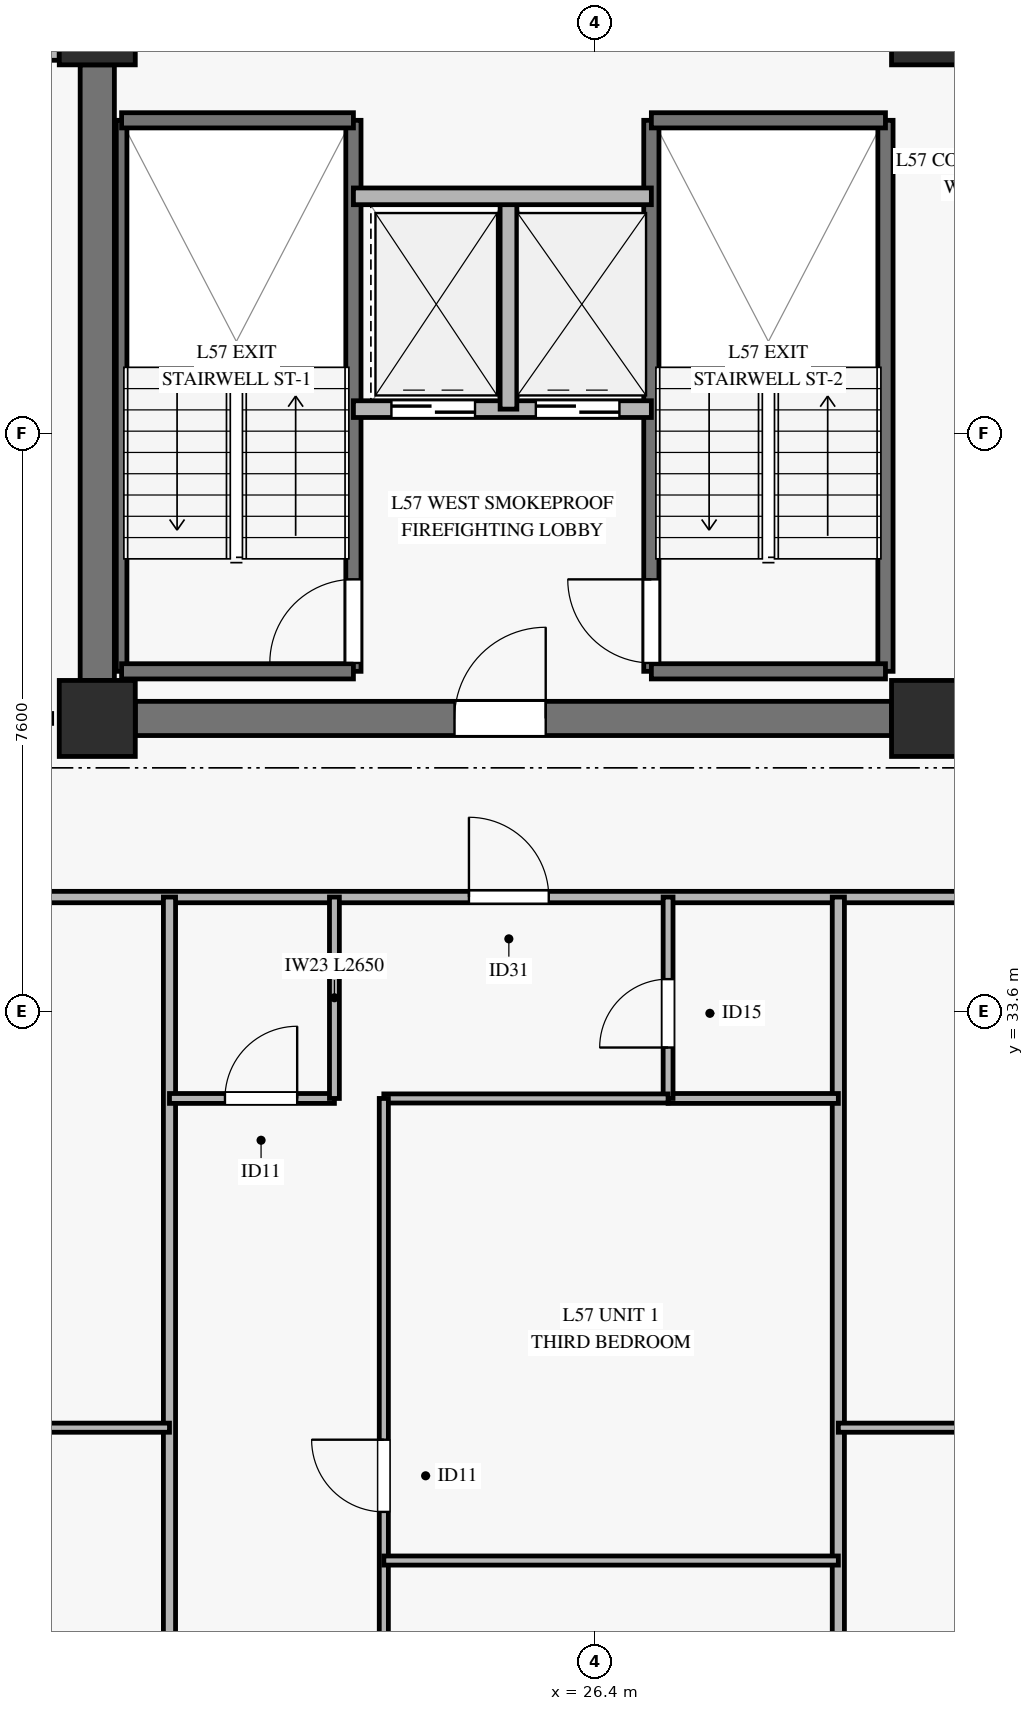
"""IFC4 building model, lengths in metres.
Left out: names, types, materials, properties, quantities, classifications, styles, units other than length and angle.
Written with IfcOpenShell. Run it as: python <this file> out.ifc"""

import sys

from ifc_helpers import new_model, si_unit, direction, frame, frame_2d, origin, origin_2d, place, context, subcontext, project, spatial, rectangle, extrude, source, transform, mapped, element, fill, save


model = new_model("IFC4")
c1 = context("Model", 3, precision=1e-05, world=origin(), true_north=direction((0.0, 1.0)))
c2 = subcontext(c1, "Body", "Model", "MODEL_VIEW")
j1 = project(units=[si_unit("LENGTHUNIT", "METRE"), si_unit("PLANEANGLEUNIT", "RADIAN")], contexts=[c1])
p1 = place(None, origin())
s1 = spatial("IfcSite", under=j1, at=p1, CompositionType="ELEMENT")
p2 = place(p1, origin())
s2 = spatial("IfcBuilding", under=s1, at=p2, CompositionType="ELEMENT")
p3 = place(p2, frame((0.0, 0.0, 227.0)))
s3 = spatial("IfcBuildingStorey", under=s2, at=p3, CompositionType="ELEMENT", Elevation=227.0)
m1 = source(origin(), c2, "Body", "SweptSolid", [
    extrude(rectangle(XDim=1.0, YDim=1.0, at=origin_2d()), origin(), (0.0, 0.0, 1.0), 3.185),
])
for number, where, z_axis, x_axis in (
    (1, (19.85, 37.45, 0.0), (0.0, 0.0, 1.0), (1.0, 0.0, 0.0)),
    (2, (19.85, 46.55, 0.0), (0.0, 0.0, 1.0), (1.0, 0.0, 0.0)),
    (3, (30.8, 37.45, 0.0), (0.0, 0.0, 1.0), (1.0, 0.0, 0.0)),
    (4, (30.8, 46.55, 0.0), (0.0, 0.0, 1.0), (1.0, 0.0, 0.0)),
):
    element("IfcColumn", number, at=place(p3, frame(where, z_axis=z_axis, x_axis=x_axis)), inside=s3, PredefinedType="PILASTER", context=c2, shape_type="MappedRepresentation", body=[
        mapped(m1, transform((0.0, 0.0, 0.0), x_axis=(1.0, 0.0, 0.0), y_axis=(0.0, 1.0, 0.0), z_axis=(0.0, 0.0, 1.0), scale=1.0)),
    ])
p4 = place(p3, frame((20.35, 37.45, 0.0), z_axis=(0.0, 0.0, 1.0), x_axis=(1.0, 0.0, 0.0)))
e5 = element("IfcWall", 5, at=p4, inside=s3, PredefinedType="SHEAR", context=c2, shape_type="SweptSolid", body=[
    extrude(rectangle(XDim=9.95, YDim=0.45, at=frame_2d((4.975, 0.0))), origin(), (0.0, 0.0, 1.0), 3.185),
])
p5 = place(p4, frame((4.2, 0.0, 0.0)))
e6 = element("IfcOpeningElement", 6, at=p5, cuts=e5, PredefinedType="OPENING", context=c2, shape_type="SweptSolid", body=[
    extrude(rectangle(XDim=1.2, YDim=2.15, at=frame_2d((0.6, 1.075))), frame((0.0, 0.235, 0.0), z_axis=(0.0, -1.0, 0.0), x_axis=(1.0, 0.0, 0.0)), (0.0, 0.0, 1.0), 0.47),
])
p6 = place(p3, frame((19.85, 37.95, 0.0), z_axis=(0.0, 0.0, 1.0), x_axis=(0.0, 1.0, 0.0)))
e7 = element("IfcWall", 7, at=p6, inside=s3, PredefinedType="SHEAR", context=c2, shape_type="SweptSolid", body=[
    extrude(rectangle(XDim=8.1, YDim=0.45, at=frame_2d((4.05, 0.0))), origin(), (0.0, 0.0, 1.0), 3.185),
])
p7 = place(p3, frame((10.54, 46.25, 0.0), z_axis=(0.0, 0.0, 1.0), x_axis=(1.0, 0.0, 0.0)))
e8 = element("IfcWall", 8, at=p7, inside=s3, PredefinedType="SOLIDWALL", context=c2, shape_type="SweptSolid", body=[
    extrude(rectangle(XDim=8.81, YDim=0.28, at=frame_2d((4.405, 0.0))), origin(), (0.0, 0.0, 1.0), 2.815),
])
p8 = place(p7, frame((3.605, 0.0, 0.45)))
e9 = element("IfcOpeningElement", 9, at=p8, cuts=e8, PredefinedType="OPENING", context=c2, shape_type="SweptSolid", body=[
    extrude(rectangle(XDim=1.6, YDim=2.0, at=frame_2d((0.8, 1.0))), frame((0.0, 0.15, 0.0), z_axis=(0.0, -1.0, 0.0), x_axis=(1.0, 0.0, 0.0)), (0.0, 0.0, 1.0), 0.3),
])
p9 = place(p3, frame((20.17, 38.07, 0.0), z_axis=(0.0, 0.0, 1.0), x_axis=(0.0, 1.0, 0.0)))
e10 = element("IfcWall", 10, at=p9, inside=s3, PredefinedType="SOLIDWALL", context=c2, shape_type="SweptSolid", body=[
    extrude(rectangle(XDim=7.25, YDim=0.14, at=frame_2d((3.625, 0.0))), origin(), (0.0, 0.0, 1.0), 3.4),
])
p10 = place(p3, frame((23.22, 38.07, 0.0), z_axis=(0.0, 0.0, 1.0), x_axis=(0.0, 1.0, 0.0)))
e11 = element("IfcWall", 11, at=p10, inside=s3, PredefinedType="SOLIDWALL", context=c2, shape_type="SweptSolid", body=[
    extrude(rectangle(XDim=7.25, YDim=0.2, at=frame_2d((3.625, 0.0))), origin(), (0.0, 0.0, 1.0), 3.4),
])
p11 = place(p10, frame((0.11, 0.0, 0.0)))
e12 = element("IfcOpeningElement", 12, at=p11, cuts=e11, PredefinedType="OPENING", context=c2, shape_type="SweptSolid", body=[
    extrude(rectangle(XDim=1.1, YDim=2.15, at=frame_2d((0.55, 1.075))), frame((0.0, 0.11, 0.0), z_axis=(0.0, -1.0, 0.0), x_axis=(1.0, 0.0, 0.0)), (0.0, 0.0, 1.0), 0.22),
])
for number, where, z_axis, x_axis in (
    (13, (20.17, 45.32, 0.0), (0.0, 0.0, 1.0), (1.0, 0.0, 0.0)),
    (14, (20.17, 38.07, 0.0), (0.0, 0.0, 1.0), (1.0, 0.0, 0.0)),
):
    element("IfcWall", number, at=place(p3, frame(where, z_axis=z_axis, x_axis=x_axis)), inside=s3, PredefinedType="SOLIDWALL", context=c2, shape_type="SweptSolid", body=[
        extrude(rectangle(XDim=3.05, YDim=0.2, at=frame_2d((1.525, 0.0))), origin(), (0.0, 0.0, 1.0), 3.4),
    ])
p12 = place(p3, frame((27.14, 38.07, 0.0), z_axis=(0.0, 0.0, 1.0), x_axis=(0.0, 1.0, 0.0)))
e15 = element("IfcWall", 15, at=p12, inside=s3, PredefinedType="SOLIDWALL", context=c2, shape_type="SweptSolid", body=[
    extrude(rectangle(XDim=7.25, YDim=0.2, at=frame_2d((3.625, 0.0))), origin(), (0.0, 0.0, 1.0), 3.4),
])
p13 = place(p12, frame((0.11, 0.0, 0.0)))
e16 = element("IfcOpeningElement", 16, at=p13, cuts=e15, PredefinedType="OPENING", context=c2, shape_type="SweptSolid", body=[
    extrude(rectangle(XDim=1.1, YDim=2.15, at=frame_2d((0.55, 1.075))), frame((0.0, 0.11, 0.0), z_axis=(0.0, -1.0, 0.0), x_axis=(1.0, 0.0, 0.0)), (0.0, 0.0, 1.0), 0.22),
])
p14 = place(p3, frame((30.22, 38.07, 0.0), z_axis=(0.0, 0.0, 1.0), x_axis=(0.0, 1.0, 0.0)))
e17 = element("IfcWall", 17, at=p14, inside=s3, PredefinedType="SOLIDWALL", context=c2, shape_type="SweptSolid", body=[
    extrude(rectangle(XDim=7.25, YDim=0.2, at=frame_2d((3.625, 0.0))), origin(), (0.0, 0.0, 1.0), 3.4),
])
for number, where, z_axis, x_axis in (
    (18, (27.14, 45.32, 0.0), (0.0, 0.0, 1.0), (1.0, 0.0, 0.0)),
    (19, (27.14, 38.07, 0.0), (0.0, 0.0, 1.0), (1.0, 0.0, 0.0)),
):
    element("IfcWall", number, at=place(p3, frame(where, z_axis=z_axis, x_axis=x_axis)), inside=s3, PredefinedType="SOLIDWALL", context=c2, shape_type="SweptSolid", body=[
        extrude(rectangle(XDim=3.08, YDim=0.2, at=frame_2d((1.54, 0.0))), origin(), (0.0, 0.0, 1.0), 3.4),
    ])
p15 = place(p3, frame((23.22, 41.52, 0.0), z_axis=(0.0, 0.0, 1.0), x_axis=(1.0, 0.0, 0.0)))
e20 = element("IfcWall", 20, at=p15, inside=s3, PredefinedType="SOLIDWALL", context=c2, shape_type="SweptSolid", body=[
    extrude(rectangle(XDim=3.92, YDim=0.22, at=frame_2d((1.96, 0.0))), origin(), (0.0, 0.0, 1.0), 3.185),
])
p16 = place(p15, frame((0.5, 0.0, 0.0)))
e21 = element("IfcOpeningElement", 21, at=p16, cuts=e20, PredefinedType="OPENING", context=c2, shape_type="SweptSolid", body=[
    extrude(rectangle(XDim=1.1, YDim=2.2, at=frame_2d((0.55, 1.1))), frame((0.0, 0.12, 0.0), z_axis=(0.0, -1.0, 0.0), x_axis=(1.0, 0.0, 0.0)), (0.0, 0.0, 1.0), 0.24),
])
p17 = place(p15, frame((2.4, 0.0, 0.0)))
e22 = element("IfcOpeningElement", 22, at=p17, cuts=e20, PredefinedType="OPENING", context=c2, shape_type="SweptSolid", body=[
    extrude(rectangle(XDim=1.1, YDim=2.2, at=frame_2d((0.55, 1.1))), frame((0.0, 0.12, 0.0), z_axis=(0.0, -1.0, 0.0), x_axis=(1.0, 0.0, 0.0)), (0.0, 0.0, 1.0), 0.24),
])
p18 = place(p3, frame((25.26, 41.52, 0.0), z_axis=(0.0, 0.0, 1.0), x_axis=(0.0, 1.0, 0.0)))
e23 = element("IfcWall", 23, at=p18, inside=s3, PredefinedType="SOLIDWALL", context=c2, shape_type="SweptSolid", body=[
    extrude(rectangle(XDim=2.8, YDim=0.22, at=frame_2d((1.4, 0.0))), origin(), (0.0, 0.0, 1.0), 3.185),
])
p19 = place(p3, frame((23.22, 44.32, 0.0), z_axis=(0.0, 0.0, 1.0), x_axis=(1.0, 0.0, 0.0)))
e24 = element("IfcWall", 24, at=p19, inside=s3, PredefinedType="SOLIDWALL", context=c2, shape_type="SweptSolid", body=[
    extrude(rectangle(XDim=3.92, YDim=0.22, at=frame_2d((1.96, 0.0))), origin(), (0.0, 0.0, 1.0), 3.185),
])
p20 = place(p3, frame((7.533, 35.1, 0.0), z_axis=(0.0, 0.0, 1.0), x_axis=(1.0, 0.0, 0.0)))
e25 = element("IfcWall", 25, at=p20, inside=s3, PredefinedType="PARTITIONING", context=c2, shape_type="SweptSolid", body=[
    extrude(rectangle(XDim=55.334, YDim=0.15, at=frame_2d((27.667, 0.0))), origin(), (0.0, 0.0, 1.0), 2.37),
])
p21 = place(p20, frame((5.335, 0.0, 0.0)))
e26 = element("IfcOpeningElement", 26, at=p21, cuts=e25, PredefinedType="OPENING", context=c2, shape_type="SweptSolid", body=[
    extrude(rectangle(XDim=1.05, YDim=2.15, at=frame_2d((0.525, 1.075))), frame((0.0, 0.085, 0.0), z_axis=(0.0, -1.0, 0.0), x_axis=(1.0, 0.0, 0.0)), (0.0, 0.0, 1.0), 0.17),
])
p22 = place(p20, frame((17.207, 0.0, 0.0)))
e27 = element("IfcOpeningElement", 27, at=p22, cuts=e25, PredefinedType="OPENING", context=c2, shape_type="SweptSolid", body=[
    extrude(rectangle(XDim=1.05, YDim=2.15, at=frame_2d((0.525, 1.075))), frame((0.0, 0.085, 0.0), z_axis=(0.0, -1.0, 0.0), x_axis=(1.0, 0.0, 0.0)), (0.0, 0.0, 1.0), 0.17),
])
p23 = place(p20, frame((25.884, 0.0, 0.0)))
e28 = element("IfcOpeningElement", 28, at=p23, cuts=e25, PredefinedType="OPENING", context=c2, shape_type="SweptSolid", body=[
    extrude(rectangle(XDim=1.05, YDim=2.15, at=frame_2d((0.525, 1.075))), frame((0.0, 0.085, 0.0), z_axis=(0.0, -1.0, 0.0), x_axis=(1.0, 0.0, 0.0)), (0.0, 0.0, 1.0), 0.17),
])
p24 = place(p20, frame((35.712, 0.0, 0.0)))
e29 = element("IfcOpeningElement", 29, at=p24, cuts=e25, PredefinedType="OPENING", context=c2, shape_type="SweptSolid", body=[
    extrude(rectangle(XDim=1.05, YDim=2.15, at=frame_2d((0.525, 1.075))), frame((0.0, 0.085, 0.0), z_axis=(0.0, -1.0, 0.0), x_axis=(1.0, 0.0, 0.0)), (0.0, 0.0, 1.0), 0.17),
])
p25 = place(p20, frame((47.078, 0.0, 0.0)))
e30 = element("IfcOpeningElement", 30, at=p25, cuts=e25, PredefinedType="OPENING", context=c2, shape_type="SweptSolid", body=[
    extrude(rectangle(XDim=1.05, YDim=2.15, at=frame_2d((0.525, 1.075))), frame((0.0, 0.085, 0.0), z_axis=(0.0, -1.0, 0.0), x_axis=(1.0, 0.0, 0.0)), (0.0, 0.0, 1.0), 0.17),
])
for number, where, z_axis, x_axis in (
    (31, (20.8, 13.25, 0.0), (0.0, 0.0, 1.0), (0.0, 1.0, 0.0)),
    (32, (29.6, 13.25, 0.0), (0.0, 0.0, 1.0), (0.0, 1.0, 0.0)),
):
    element("IfcWall", number, at=place(p3, frame(where, z_axis=z_axis, x_axis=x_axis)), inside=s3, PredefinedType="PARTITIONING", context=c2, shape_type="SweptSolid", body=[
        extrude(rectangle(XDim=21.85, YDim=0.16, at=frame_2d((10.925, 0.0))), origin(), (0.0, 0.0, 1.0), 2.77),
    ])
p26 = place(p3, frame((7.533, 28.118, 0.0), z_axis=(0.0, 0.0, 1.0), x_axis=(1.0, 0.0, 0.0)))
e33 = element("IfcWall", 33, at=p26, inside=s3, PredefinedType="PARTITIONING", context=c2, shape_type="SweptSolid", body=[
    extrude(rectangle(XDim=13.267, YDim=0.12, at=frame_2d((6.634, 0.0))), origin(), (0.0, 0.0, 1.0), 2.37),
])
p27 = place(p26, frame((5.593, 0.0, 0.0)))
e34 = element("IfcOpeningElement", 34, at=p27, cuts=e33, PredefinedType="OPENING", context=c2, shape_type="SweptSolid", body=[
    extrude(rectangle(XDim=0.95, YDim=2.1, at=frame_2d((0.475, 1.05))), frame((0.0, 0.07, 0.0), z_axis=(0.0, -1.0, 0.0), x_axis=(1.0, 0.0, 0.0)), (0.0, 0.0, 1.0), 0.14),
])
p28 = place(p3, frame((20.8, 32.45, 0.0), z_axis=(0.0, 0.0, 1.0), x_axis=(1.0, 0.0, 0.0)))
e35 = element("IfcWall", 35, at=p28, inside=s3, PredefinedType="PARTITIONING", context=c2, shape_type="SweptSolid", body=[
    extrude(rectangle(XDim=2.17, YDim=0.13, at=frame_2d((1.085, 0.0))), origin(), (0.0, 0.0, 1.0), 2.77),
])
p29 = place(p28, frame((0.73, 0.0, 0.0)))
e36 = element("IfcOpeningElement", 36, at=p29, cuts=e35, PredefinedType="OPENING", context=c2, shape_type="SweptSolid", body=[
    extrude(rectangle(XDim=0.95, YDim=2.1, at=frame_2d((0.475, 1.05))), frame((0.0, 0.075, 0.0), z_axis=(0.0, -1.0, 0.0), x_axis=(1.0, 0.0, 0.0)), (0.0, 0.0, 1.0), 0.15),
])
p30 = place(p3, frame((22.97, 32.45, 0.0), z_axis=(0.0, 0.0, 1.0), x_axis=(0.0, 1.0, 0.0)))
e37 = element("IfcWall", 37, at=p30, inside=s3, PredefinedType="PARTITIONING", context=c2, shape_type="SweptSolid", body=[
    extrude(rectangle(XDim=2.65, YDim=0.13, at=frame_2d((1.325, 0.0))), origin(), (0.0, 0.0, 1.0), 2.77),
])
p31 = place(p3, frame((27.36, 32.45, 0.0), z_axis=(0.0, 0.0, 1.0), x_axis=(1.0, 0.0, 0.0)))
e38 = element("IfcWall", 38, at=p31, inside=s3, PredefinedType="PARTITIONING", context=c2, shape_type="SweptSolid", body=[
    extrude(rectangle(XDim=2.24, YDim=0.13, at=frame_2d((1.12, 0.0))), origin(), (0.0, 0.0, 1.0), 2.77),
])
p32 = place(p3, frame((27.36, 32.45, 0.0), z_axis=(0.0, 0.0, 1.0), x_axis=(0.0, 1.0, 0.0)))
e39 = element("IfcWall", 39, at=p32, inside=s3, PredefinedType="PARTITIONING", context=c2, shape_type="SweptSolid", body=[
    extrude(rectangle(XDim=2.65, YDim=0.13, at=frame_2d((1.325, 0.0))), origin(), (0.0, 0.0, 1.0), 2.77),
])
p33 = place(p32, frame((0.67, 0.0, 0.0)))
e40 = element("IfcOpeningElement", 40, at=p33, cuts=e39, PredefinedType="OPENING", context=c2, shape_type="SweptSolid", body=[
    extrude(rectangle(XDim=0.9, YDim=2.1, at=frame_2d((0.45, 1.05))), frame((0.0, 0.075, 0.0), z_axis=(0.0, -1.0, 0.0), x_axis=(1.0, 0.0, 0.0)), (0.0, 0.0, 1.0), 0.15),
])
p34 = place(p3, frame((23.62, 32.45, 0.0), z_axis=(0.0, 0.0, 1.0), x_axis=(1.0, 0.0, 0.0)))
e41 = element("IfcWall", 41, at=p34, inside=s3, PredefinedType="PARTITIONING", context=c2, shape_type="SweptSolid", body=[
    extrude(rectangle(XDim=3.74, YDim=0.12, at=frame_2d((1.87, 0.0))), origin(), (0.0, 0.0, 1.0), 2.77),
])
p35 = place(p3, frame((23.62, 13.25, 0.0), z_axis=(0.0, 0.0, 1.0), x_axis=(0.0, 1.0, 0.0)))
e42 = element("IfcWall", 42, at=p35, inside=s3, PredefinedType="PARTITIONING", context=c2, shape_type="SweptSolid", body=[
    extrude(rectangle(XDim=19.2, YDim=0.12, at=frame_2d((9.6, 0.0))), origin(), (0.0, 0.0, 1.0), 2.77),
])
p36 = place(p35, frame((0.67, 0.0, 0.0)))
e43 = element("IfcOpeningElement", 43, at=p36, cuts=e42, PredefinedType="OPENING", context=c2, shape_type="SweptSolid", body=[
    extrude(rectangle(XDim=0.95, YDim=2.1, at=frame_2d((0.475, 1.05))), frame((0.0, 0.07, 0.0), z_axis=(0.0, -1.0, 0.0), x_axis=(1.0, 0.0, 0.0)), (0.0, 0.0, 1.0), 0.14),
])
p37 = place(p35, frame((7.68, 0.0, 0.0)))
e44 = element("IfcOpeningElement", 44, at=p37, cuts=e42, PredefinedType="OPENING", context=c2, shape_type="SweptSolid", body=[
    extrude(rectangle(XDim=0.95, YDim=2.1, at=frame_2d((0.475, 1.05))), frame((0.0, 0.07, 0.0), z_axis=(0.0, -1.0, 0.0), x_axis=(1.0, 0.0, 0.0)), (0.0, 0.0, 1.0), 0.14),
])
p38 = place(p35, frame((13.76, 0.0, 0.0)))
e45 = element("IfcOpeningElement", 45, at=p38, cuts=e42, PredefinedType="OPENING", context=c2, shape_type="SweptSolid", body=[
    extrude(rectangle(XDim=0.95, YDim=2.1, at=frame_2d((0.475, 1.05))), frame((0.0, 0.07, 0.0), z_axis=(0.0, -1.0, 0.0), x_axis=(1.0, 0.0, 0.0)), (0.0, 0.0, 1.0), 0.14),
])
p39 = place(p3, frame((23.62, 26.37, 0.0), z_axis=(0.0, 0.0, 1.0), x_axis=(1.0, 0.0, 0.0)))
e46 = element("IfcWall", 46, at=p39, inside=s3, PredefinedType="PARTITIONING", context=c2, shape_type="SweptSolid", body=[
    extrude(rectangle(XDim=5.98, YDim=0.12, at=frame_2d((2.99, 0.0))), origin(), (0.0, 0.0, 1.0), 3.185),
])
p40 = place(p3, frame((29.6, 28.118, 0.0), z_axis=(0.0, 0.0, 1.0), x_axis=(1.0, 0.0, 0.0)))
e47 = element("IfcWall", 47, at=p40, inside=s3, PredefinedType="PARTITIONING", context=c2, shape_type="SweptSolid", body=[
    extrude(rectangle(XDim=9.6, YDim=0.12, at=frame_2d((4.8, 0.0))), origin(), (0.0, 0.0, 1.0), 2.37),
])
p41 = place(p40, frame((4.006, 0.0, 0.0)))
e48 = element("IfcOpeningElement", 48, at=p41, cuts=e47, PredefinedType="OPENING", context=c2, shape_type="SweptSolid", body=[
    extrude(rectangle(XDim=0.95, YDim=2.1, at=frame_2d((0.475, 1.05))), frame((0.0, 0.07, 0.0), z_axis=(0.0, -1.0, 0.0), x_axis=(1.0, 0.0, 0.0)), (0.0, 0.0, 1.0), 0.14),
])
m2 = source(origin(), c2, "Body", "SweptSolid", [
    extrude(rectangle(XDim=1.1, YDim=2.15, at=frame_2d((0.55, 1.075))), frame((0.0, 0.025, 0.0), z_axis=(0.0, -1.0, 0.0), x_axis=(1.0, 0.0, 0.0)), (0.0, 0.0, 1.0), 0.05),
])
p42 = place(p11, origin())
e49 = element("IfcDoor", 49, at=p42, inside=s3, OperationType="SINGLE_SWING_LEFT", PredefinedType="DOOR", context=c2, shape_type="MappedRepresentation", body=[
    mapped(m2, transform((0.0, 0.0, 0.0), x_axis=(1.0, 0.0, 0.0), y_axis=(0.0, 1.0, 0.0), z_axis=(0.0, 0.0, 1.0), scale=1.0)),
])
fill(e12, e49)
p43 = place(p13, origin())
e50 = element("IfcDoor", 50, at=p43, inside=s3, OperationType="SINGLE_SWING_RIGHT", PredefinedType="DOOR", context=c2, shape_type="MappedRepresentation", body=[
    mapped(m2, transform((0.0, 0.0, 0.0), x_axis=(1.0, 0.0, 0.0), y_axis=(0.0, 1.0, 0.0), z_axis=(0.0, 0.0, 1.0), scale=1.0)),
])
fill(e16, e50)
m3 = source(origin(), c2, "Body", "SweptSolid", [
    extrude(rectangle(XDim=1.1, YDim=2.2, at=frame_2d((0.55, 1.1))), frame((0.0, 0.025, 0.0), z_axis=(0.0, -1.0, 0.0), x_axis=(1.0, 0.0, 0.0)), (0.0, 0.0, 1.0), 0.05),
])
p44 = place(p16, origin())
e51 = element("IfcDoor", 51, at=p44, inside=s3, OperationType="SLIDING_TO_LEFT", PredefinedType="DOOR", context=c2, shape_type="MappedRepresentation", body=[
    mapped(m3, transform((0.0, 0.0, 0.0), x_axis=(1.0, 0.0, 0.0), y_axis=(0.0, 1.0, 0.0), z_axis=(0.0, 0.0, 1.0), scale=1.0)),
])
fill(e21, e51)
p45 = place(p17, origin())
e52 = element("IfcDoor", 52, at=p45, inside=s3, OperationType="SLIDING_TO_LEFT", PredefinedType="DOOR", context=c2, shape_type="MappedRepresentation", body=[
    mapped(m3, transform((0.0, 0.0, 0.0), x_axis=(1.0, 0.0, 0.0), y_axis=(0.0, 1.0, 0.0), z_axis=(0.0, 0.0, 1.0), scale=1.0)),
])
fill(e22, e52)
m4 = source(origin(), c2, "Body", "SweptSolid", [
    extrude(rectangle(XDim=1.2, YDim=2.15, at=frame_2d((0.6, 1.075))), frame((0.0, 0.025, 0.0), z_axis=(0.0, -1.0, 0.0), x_axis=(1.0, 0.0, 0.0)), (0.0, 0.0, 1.0), 0.05),
])
p46 = place(p5, origin())
e53 = element("IfcDoor", 53, at=p46, inside=s3, OperationType="SINGLE_SWING_RIGHT", PredefinedType="DOOR", context=c2, shape_type="MappedRepresentation", body=[
    mapped(m4, transform((0.0, 0.0, 0.0), x_axis=(1.0, 0.0, 0.0), y_axis=(0.0, 1.0, 0.0), z_axis=(0.0, 0.0, 1.0), scale=1.0)),
])
fill(e6, e53)
m5 = source(origin(), c2, "Body", "SweptSolid", [
    extrude(rectangle(XDim=1.05, YDim=2.15, at=frame_2d((0.525, 1.075))), frame((0.0, 0.025, 0.0), z_axis=(0.0, -1.0, 0.0), x_axis=(1.0, 0.0, 0.0)), (0.0, 0.0, 1.0), 0.05),
])
p47 = place(p22, origin())
e54 = element("IfcDoor", 54, at=p47, inside=s3, OperationType="SINGLE_SWING_LEFT", PredefinedType="DOOR", context=c2, shape_type="MappedRepresentation", body=[
    mapped(m5, transform((0.0, 0.0, 0.0), x_axis=(1.0, 0.0, 0.0), y_axis=(0.0, 1.0, 0.0), z_axis=(0.0, 0.0, 1.0), scale=1.0)),
])
fill(e27, e54)
m6 = source(origin(), c2, "Body", "SweptSolid", [
    extrude(rectangle(XDim=0.95, YDim=2.1, at=frame_2d((0.475, 1.05))), frame((0.0, 0.025, 0.0), z_axis=(0.0, -1.0, 0.0), x_axis=(1.0, 0.0, 0.0)), (0.0, 0.0, 1.0), 0.05),
])
p48 = place(p29, origin())
e55 = element("IfcDoor", 55, at=p48, inside=s3, OperationType="SINGLE_SWING_RIGHT", PredefinedType="DOOR", context=c2, shape_type="MappedRepresentation", body=[
    mapped(m6, transform((0.0, 0.0, 0.0), x_axis=(1.0, 0.0, 0.0), y_axis=(0.0, 1.0, 0.0), z_axis=(0.0, 0.0, 1.0), scale=1.0)),
])
fill(e36, e55)
m7 = source(origin(), c2, "Body", "SweptSolid", [
    extrude(rectangle(XDim=0.9, YDim=2.1, at=frame_2d((0.45, 1.05))), frame((0.0, 0.025, 0.0), z_axis=(0.0, -1.0, 0.0), x_axis=(1.0, 0.0, 0.0)), (0.0, 0.0, 1.0), 0.05),
])
p49 = place(p33, origin())
e56 = element("IfcDoor", 56, at=p49, inside=s3, OperationType="SINGLE_SWING_LEFT", PredefinedType="DOOR", context=c2, shape_type="MappedRepresentation", body=[
    mapped(m7, transform((0.0, 0.0, 0.0), x_axis=(1.0, 0.0, 0.0), y_axis=(0.0, 1.0, 0.0), z_axis=(0.0, 0.0, 1.0), scale=1.0)),
])
fill(e40, e56)
p50 = place(p38, origin())
e57 = element("IfcDoor", 57, at=p50, inside=s3, OperationType="SINGLE_SWING_RIGHT", PredefinedType="DOOR", context=c2, shape_type="MappedRepresentation", body=[
    mapped(m6, transform((0.0, 0.0, 0.0), x_axis=(1.0, 0.0, 0.0), y_axis=(0.0, 1.0, 0.0), z_axis=(0.0, 0.0, 1.0), scale=1.0)),
])
fill(e45, e57)
save(model, sys.argv[1])
